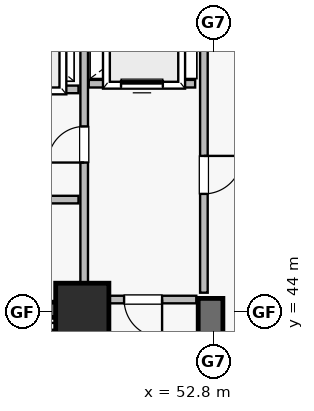
"""IFC4 building model, lengths in metres.
Left out: names, types, materials, properties, quantities, classifications, styles, units other than length and angle.
Written with IfcOpenShell. Run it as: python <this file> out.ifc"""

import sys

from ifc_helpers import new_model, si_unit, direction, frame, frame_2d, origin, origin_2d, place, context, subcontext, project, spatial, rectangle, extrude, element, fill, save


model = new_model("IFC4")
c1 = context("Model", 3, precision=1e-05, world=origin(), true_north=direction((0.0, 1.0)))
c2 = subcontext(c1, "Body", "Model", "MODEL_VIEW")
j1 = project(units=[si_unit("LENGTHUNIT", "METRE"), si_unit("PLANEANGLEUNIT", "RADIAN")], contexts=[c1])
p1 = place(None, origin())
s1 = spatial("IfcSite", under=j1, at=p1, CompositionType="ELEMENT")
p2 = place(p1, origin())
s2 = spatial("IfcBuilding", under=s1, at=p2, CompositionType="ELEMENT")
p3 = place(p2, frame((0.0, 0.0, -3.9)))
s3 = spatial("IfcBuildingStorey", under=s2, at=p3, CompositionType="ELEMENT", Elevation=-3.9)
p4 = place(p3, frame((52.725, 34.95, 0.0), z_axis=(0.0, 0.0, 1.0), x_axis=(0.0, 1.0, 0.0)))
e1 = element("IfcWall", 1, at=p4, inside=s3, PredefinedType="SHEAR", context=c2, shape_type="SweptSolid", body=[
    extrude(rectangle(XDim=9.4, YDim=0.65, at=frame_2d((4.7, 0.0))), origin(), (0.0, 0.0, 1.0), 3.6),
])
p5 = place(p3, frame((49.225, 35.4, 0.0), z_axis=(0.0, 0.0, 1.0), x_axis=(0.0, 1.0, 0.0)))
e2 = element("IfcWall", 2, at=p5, inside=s3, PredefinedType="SHEAR", context=c2, shape_type="SweptSolid", body=[
    extrude(rectangle(XDim=8.95, YDim=0.65, at=frame_2d((4.475, 0.0))), origin(), (0.0, 0.0, 1.0), 3.6),
])
p6 = place(p3, frame((45.05, 44.05, 0.0), z_axis=(0.0, 0.0, 1.0), x_axis=(1.0, 0.0, 0.0)))
e3 = element("IfcWall", 3, at=p6, inside=s3, PredefinedType="SHEAR", context=c2, shape_type="SweptSolid", body=[
    extrude(rectangle(XDim=4.2, YDim=0.4, at=frame_2d((2.1, 0.0))), origin(), (0.0, 0.0, 1.0), 3.6),
])
p7 = place(p3, frame((49.35, 44.05, 0.0), z_axis=(0.0, 0.0, 1.0), x_axis=(1.0, 0.0, 0.0)))
e4 = element("IfcColumn", 4, at=p7, inside=s3, PredefinedType="COLUMN", context=c2, shape_type="SweptSolid", body=[
    extrude(rectangle(XDim=1.4, YDim=1.4, at=origin_2d()), origin(), (0.0, 0.0, 1.0), 3.9),
])
p8 = place(p3, frame((52.55, 44.5, 0.0), z_axis=(0.0, 0.0, 1.0), x_axis=(0.0, 1.0, 0.0)))
e5 = element("IfcWall", 5, at=p8, inside=s3, PredefinedType="SOLIDWALL", context=c2, shape_type="SweptSolid", body=[
    extrude(rectangle(XDim=7.92, YDim=0.2, at=frame_2d((3.96, 0.0))), origin(), (0.0, 0.0, 1.0), 3.6),
])
p9 = place(p8, frame((2.6, 0.0, 0.0)))
e6 = element("IfcOpeningElement", 6, at=p9, cuts=e5, PredefinedType="OPENING", context=c2, shape_type="SweptSolid", body=[
    extrude(rectangle(XDim=1.0, YDim=2.15, at=frame_2d((0.5, 1.075))), frame((0.0, 0.11, 0.0), z_axis=(0.0, -1.0, 0.0), x_axis=(1.0, 0.0, 0.0)), (0.0, 0.0, 1.0), 0.22),
])
p10 = place(p3, frame((49.4, 44.5, 0.0), z_axis=(0.0, 0.0, 1.0), x_axis=(0.0, 1.0, 0.0)))
e7 = element("IfcWall", 7, at=p10, inside=s3, PredefinedType="SOLIDWALL", context=c2, shape_type="SweptSolid", body=[
    extrude(rectangle(XDim=7.92, YDim=0.2, at=frame_2d((3.96, 0.0))), origin(), (0.0, 0.0, 1.0), 3.6),
])
p11 = place(p10, frame((3.425, 0.0, 0.0)))
e8 = element("IfcOpeningElement", 8, at=p11, cuts=e7, PredefinedType="OPENING", context=c2, shape_type="SweptSolid", body=[
    extrude(rectangle(XDim=0.95, YDim=2.15, at=frame_2d((0.475, 1.075))), frame((0.0, 0.11, 0.0), z_axis=(0.0, -1.0, 0.0), x_axis=(1.0, 0.0, 0.0)), (0.0, 0.0, 1.0), 0.22),
])
p12 = place(p3, frame((44.25, 49.85, 0.0), z_axis=(0.0, 0.0, 1.0), x_axis=(1.0, 0.0, 0.0)))
e9 = element("IfcWall", 9, at=p12, inside=s3, PredefinedType="SOLIDWALL", context=c2, shape_type="SweptSolid", body=[
    extrude(rectangle(XDim=5.0, YDim=0.2, at=frame_2d((2.5, 0.0))), origin(), (0.0, 0.0, 1.0), 2.938),
])
p13 = place(p12, frame((0.525, 0.0, 0.0)))
e10 = element("IfcOpeningElement", 10, at=p13, cuts=e9, PredefinedType="OPENING", context=c2, shape_type="SweptSolid", body=[
    extrude(rectangle(XDim=0.85, YDim=2.1, at=frame_2d((0.425, 1.05))), frame((0.0, 0.11, 0.0), z_axis=(0.0, -1.0, 0.0), x_axis=(1.0, 0.0, 0.0)), (0.0, 0.0, 1.0), 0.22),
])
p14 = place(p12, frame((2.95, 0.0, 0.0)))
e11 = element("IfcOpeningElement", 11, at=p14, cuts=e9, PredefinedType="OPENING", context=c2, shape_type="SweptSolid", body=[
    extrude(rectangle(XDim=1.1, YDim=2.15, at=frame_2d((0.55, 1.075))), frame((0.0, 0.11, 0.0), z_axis=(0.0, -1.0, 0.0), x_axis=(1.0, 0.0, 0.0)), (0.0, 0.0, 1.0), 0.22),
])
p15 = place(p3, frame((45.32, 46.95, 0.0), z_axis=(0.0, 0.0, 1.0), x_axis=(1.0, 0.0, 0.0)))
e12 = element("IfcWall", 12, at=p15, inside=s3, PredefinedType="SOLIDWALL", context=c2, shape_type="SweptSolid", body=[
    extrude(rectangle(XDim=3.93, YDim=0.2, at=frame_2d((1.965, 0.0))), origin(), (0.0, 0.0, 1.0), 2.938),
])
p16 = place(p15, frame((1.475, 0.0, 0.0)))
e13 = element("IfcOpeningElement", 13, at=p16, cuts=e12, PredefinedType="OPENING", context=c2, shape_type="SweptSolid", body=[
    extrude(rectangle(XDim=0.95, YDim=2.15, at=frame_2d((0.475, 1.075))), frame((0.0, 0.11, 0.0), z_axis=(0.0, -1.0, 0.0), x_axis=(1.0, 0.0, 0.0)), (0.0, 0.0, 1.0), 0.22),
])
p17 = place(p3, frame((49.55, 44.32, 0.0), z_axis=(0.0, 0.0, 1.0), x_axis=(1.0, 0.0, 0.0)))
e14 = element("IfcWall", 14, at=p17, inside=s3, PredefinedType="SOLIDWALL", context=c2, shape_type="SweptSolid", body=[
    extrude(rectangle(XDim=2.8, YDim=0.2, at=frame_2d((1.4, 0.0))), origin(), (0.0, 0.0, 1.0), 3.6),
])
p18 = place(p17, frame((0.9, 0.0, 0.0)))
e15 = element("IfcOpeningElement", 15, at=p18, cuts=e14, PredefinedType="OPENING", context=c2, shape_type="SweptSolid", body=[
    extrude(rectangle(XDim=1.0, YDim=2.15, at=frame_2d((0.5, 1.075))), frame((0.0, 0.11, 0.0), z_axis=(0.0, -1.0, 0.0), x_axis=(1.0, 0.0, 0.0)), (0.0, 0.0, 1.0), 0.22),
])
p19 = place(p3, frame((49.52, 50.0, 0.0), z_axis=(0.0, 0.0, 1.0), x_axis=(1.0, 0.0, 0.0)))
e16 = element("IfcWall", 16, at=p19, inside=s3, PredefinedType="SOLIDWALL", context=c2, shape_type="SweptSolid", body=[
    extrude(rectangle(XDim=2.8, YDim=0.2, at=frame_2d((1.4, 0.0))), origin(), (0.0, 0.0, 1.0), 3.6),
])
p20 = place(p19, frame((0.85, 0.0, 0.0)))
e17 = element("IfcOpeningElement", 17, at=p20, cuts=e16, PredefinedType="OPENING", context=c2, shape_type="SweptSolid", body=[
    extrude(rectangle(XDim=1.1, YDim=2.15, at=frame_2d((0.55, 1.075))), frame((0.0, 0.11, 0.0), z_axis=(0.0, -1.0, 0.0), x_axis=(1.0, 0.0, 0.0)), (0.0, 0.0, 1.0), 0.22),
])
p21 = place(p18, frame((1.0, 0.0, 0.0), z_axis=(0.0, 0.0, 1.0), x_axis=(-1.0, 0.0, 0.0)))
e18 = element("IfcDoor", 18, at=p21, inside=s3, OperationType="SINGLE_SWING_RIGHT", PredefinedType="DOOR", context=c2, shape_type="SweptSolid", body=[
    extrude(rectangle(XDim=1.0, YDim=2.15, at=frame_2d((0.5, 1.075))), frame((0.0, 0.025, 0.0), z_axis=(0.0, -1.0, 0.0), x_axis=(1.0, 0.0, 0.0)), (0.0, 0.0, 1.0), 0.05),
])
fill(e15, e18)
p22 = place(p9, frame((1.0, 0.0, 0.0), z_axis=(0.0, 0.0, 1.0), x_axis=(-1.0, 0.0, 0.0)))
e19 = element("IfcDoor", 19, at=p22, inside=s3, OperationType="SINGLE_SWING_RIGHT", PredefinedType="DOOR", context=c2, shape_type="SweptSolid", body=[
    extrude(rectangle(XDim=1.0, YDim=2.15, at=frame_2d((0.5, 1.075))), frame((0.0, 0.025, 0.0), z_axis=(0.0, -1.0, 0.0), x_axis=(1.0, 0.0, 0.0)), (0.0, 0.0, 1.0), 0.05),
])
fill(e6, e19)
p23 = place(p11, origin())
e20 = element("IfcDoor", 20, at=p23, inside=s3, OperationType="SINGLE_SWING_LEFT", PredefinedType="DOOR", context=c2, shape_type="SweptSolid", body=[
    extrude(rectangle(XDim=0.95, YDim=2.15, at=frame_2d((0.475, 1.075))), frame((0.0, 0.025, 0.0), z_axis=(0.0, -1.0, 0.0), x_axis=(1.0, 0.0, 0.0)), (0.0, 0.0, 1.0), 0.05),
])
fill(e8, e20)
p24 = place(p20, origin())
e21 = element("IfcDoor", 21, at=p24, inside=s3, OperationType="SLIDING_TO_LEFT", PredefinedType="DOOR", context=c2, shape_type="SweptSolid", body=[
    extrude(rectangle(XDim=1.1, YDim=2.15, at=frame_2d((0.55, 1.075))), frame((0.0, 0.025, 0.0), z_axis=(0.0, -1.0, 0.0), x_axis=(1.0, 0.0, 0.0)), (0.0, 0.0, 1.0), 0.05),
])
fill(e17, e21)
save(model, sys.argv[1])
